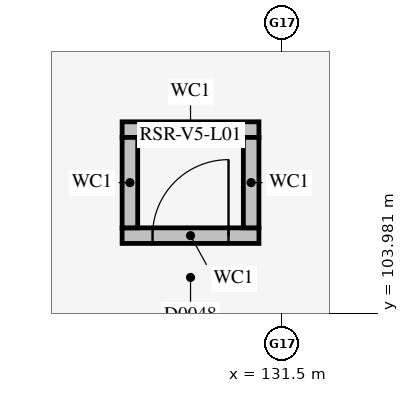
"""IFC4 building model, lengths in metres.
Left out: names, types, materials, properties, quantities, classifications, styles, units other than length and angle.
Written with IfcOpenShell. Run it as: python <this file> out.ifc"""

import sys

from ifc_helpers import new_model, si_unit, direction, frame, frame_2d, origin, place, context, subcontext, project, spatial, rectangle, extrude, element, fill, save


model = new_model("IFC4")
c1 = context("Model", 3, precision=1e-05, world=origin(), true_north=direction((0.0, 1.0)))
c2 = subcontext(c1, "Body", "Model", "MODEL_VIEW")
j1 = project(units=[si_unit("LENGTHUNIT", "METRE"), si_unit("PLANEANGLEUNIT", "RADIAN")], contexts=[c1])
p1 = place(None, origin())
s1 = spatial("IfcSite", under=j1, at=p1, CompositionType="ELEMENT")
p2 = place(p1, origin())
s2 = spatial("IfcBuilding", under=s1, at=p2, CompositionType="ELEMENT")
p3 = place(p2, frame((0.0, 0.0, 5.4)))
s3 = spatial("IfcBuildingStorey", under=s2, at=p3, CompositionType="ELEMENT", Elevation=5.4)
p4 = place(p3, frame((129.4, 105.002, 0.0), z_axis=(0.0, 0.0, 1.0), x_axis=(1.0, 0.0, 0.0)))
e1 = element("IfcWall", 1, at=p4, inside=s3, PredefinedType="SOLIDWALL", context=c2, shape_type="SweptSolid", body=[
    extrude(rectangle(XDim=1.8, YDim=0.205, at=frame_2d((0.9, 0.0))), origin(), (0.0, 0.0, 1.0), 4.545),
])
p5 = place(p4, frame((0.4, 0.0, 0.0)))
e2 = element("IfcOpeningElement", 2, at=p5, cuts=e1, PredefinedType="OPENING", context=c2, shape_type="SweptSolid", body=[
    extrude(rectangle(XDim=1.0, YDim=2.2, at=frame_2d((0.5, 1.1))), frame((0.0, 0.115, 0.0), z_axis=(0.0, -1.0, 0.0), x_axis=(1.0, 0.0, 0.0)), (0.0, 0.0, 1.0), 0.229),
])
p6 = place(p3, frame((129.4, 106.397, 0.0), z_axis=(0.0, 0.0, 1.0), x_axis=(1.0, 0.0, 0.0)))
e3 = element("IfcWall", 3, at=p6, inside=s3, PredefinedType="SOLIDWALL", context=c2, shape_type="SweptSolid", body=[
    extrude(rectangle(XDim=1.8, YDim=0.205, at=frame_2d((0.9, 0.0))), origin(), (0.0, 0.0, 1.0), 4.545),
])
for number, where, z_axis, x_axis in (
    (4, (131.097, 105.105, 0.0), (0.0, 0.0, 1.0), (0.0, 1.0, 0.0)),
    (5, (129.502, 105.105, 0.0), (0.0, 0.0, 1.0), (0.0, 1.0, 0.0)),
):
    element("IfcWall", number, at=place(p3, frame(where, z_axis=z_axis, x_axis=x_axis)), inside=s3, PredefinedType="SOLIDWALL", context=c2, shape_type="SweptSolid", body=[
        extrude(rectangle(XDim=1.19, YDim=0.205, at=frame_2d((0.595, 0.0))), origin(), (0.0, 0.0, 1.0), 4.545),
    ])
p7 = place(p5, origin())
e6 = element("IfcDoor", 6, at=p7, inside=s3, OperationType="SINGLE_SWING_RIGHT", PredefinedType="DOOR", context=c2, shape_type="SweptSolid", body=[
    extrude(rectangle(XDim=1.0, YDim=2.2, at=frame_2d((0.5, 1.1))), frame((0.0, 0.025, 0.0), z_axis=(0.0, -1.0, 0.0), x_axis=(1.0, 0.0, 0.0)), (0.0, 0.0, 1.0), 0.05),
])
fill(e2, e6)
save(model, sys.argv[1])
